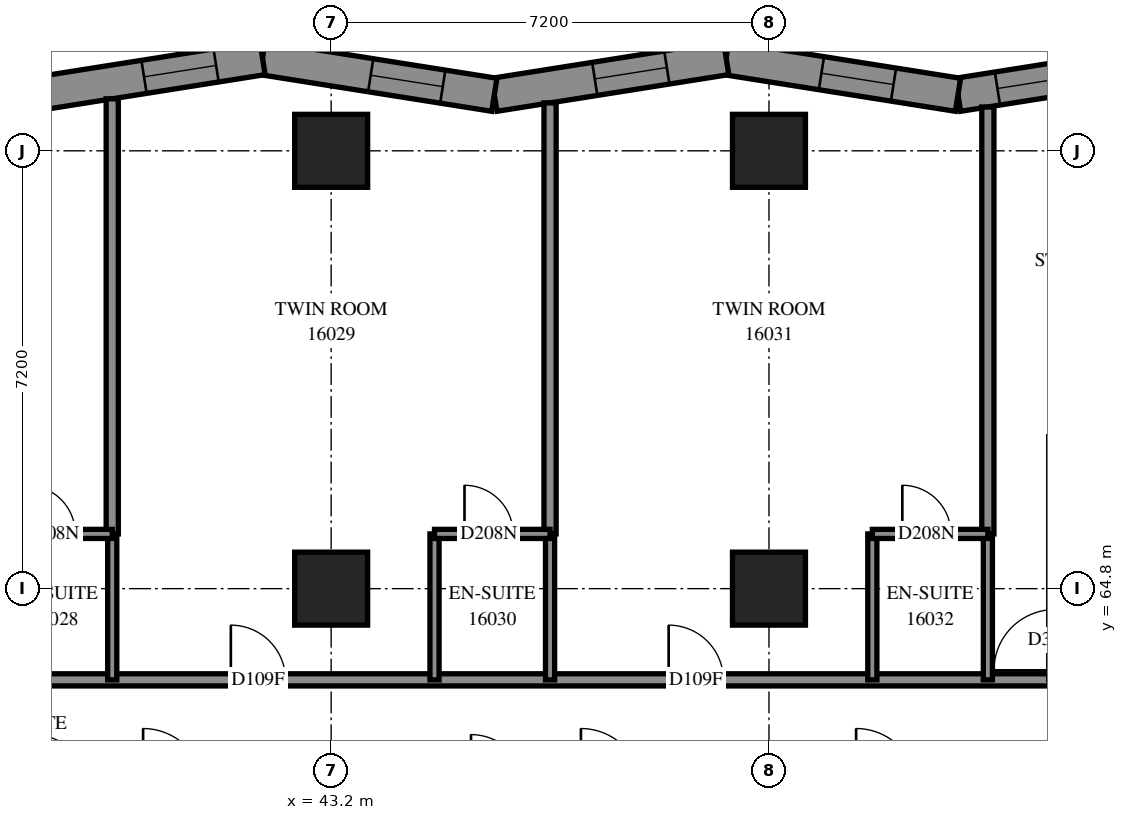
"""IFC4 building model, lengths in metres.
Left out: names, types, materials, properties, quantities, classifications, styles, units other than length and angle.
Written with IfcOpenShell. Run it as: python <this file> out.ifc"""

import sys

from ifc_helpers import new_model, si_unit, direction, frame, frame_2d, origin, origin_2d, place, context, subcontext, project, spatial, polyline, rectangle, outline, extrude, element, fill, save


model = new_model("IFC4")
c1 = context("Model", 3, precision=1e-05, world=origin(), true_north=direction((0.0, 1.0)))
c2 = subcontext(c1, "Body", "Model", "MODEL_VIEW")
j1 = project(units=[si_unit("LENGTHUNIT", "METRE"), si_unit("PLANEANGLEUNIT", "RADIAN")], contexts=[c1])
p1 = place(None, origin())
s1 = spatial("IfcSite", under=j1, at=p1, CompositionType="ELEMENT")
p2 = place(p1, origin())
s2 = spatial("IfcBuilding", under=s1, at=p2, CompositionType="ELEMENT")
p3 = place(p2, frame((0.0, 0.0, 61.0)))
s3 = spatial("IfcBuildingStorey", under=s2, at=p3, CompositionType="ELEMENT", Elevation=61.0)
for number, where, z_axis, x_axis in (
    (1, (43.2, 64.8, 0.0), (0.0, 0.0, 1.0), (1.0, 0.0, 0.0)),
    (2, (43.2, 72.0, 0.0), (0.0, 0.0, 1.0), (1.0, 0.0, 0.0)),
    (3, (50.4, 64.8, 0.0), (0.0, 0.0, 1.0), (1.0, 0.0, 0.0)),
    (4, (50.4, 72.0, 0.0), (0.0, 0.0, 1.0), (1.0, 0.0, 0.0)),
):
    element("IfcColumn", number, at=place(p3, frame(where, z_axis=z_axis, x_axis=x_axis)), inside=s3, PredefinedType="COLUMN", context=c2, shape_type="SweptSolid", body=[
        extrude(rectangle(XDim=1.2, YDim=1.2, at=origin_2d()), origin(), (0.0, 0.0, 1.0), 3.1),
    ])
p4 = place(p3, frame((57.321, 73.525, 0.0), z_axis=(0.0, 0.0, 1.0), x_axis=(-0.9877213372, -0.1562259905, 0.0)))
e5 = element("IfcWall", 5, at=p4, inside=s3, PredefinedType="SOLIDWALL", context=c2, shape_type="SweptSolid", body=[
    extrude(outline(polyline([(-0.043, -0.275), (3.816, -0.275), (3.903, 0.275), (0.043, 0.275), (-0.043, -0.275)])), origin(), (0.0, 0.0, 1.0), 3.1),
])
p5 = place(p4, frame((0.403, 0.0, 0.5)))
e6 = element("IfcOpeningElement", 6, at=p5, cuts=e5, PredefinedType="OPENING", context=c2, shape_type="SweptSolid", body=[
    extrude(rectangle(XDim=2.8, YDim=2.45, at=frame_2d((1.4, 1.225))), frame((0.0, 0.285, 0.0), z_axis=(0.0, -1.0, 0.0), x_axis=(1.0, 0.0, 0.0)), (0.0, 0.0, 1.0), 0.57),
])
p6 = place(p3, frame((53.509, 72.922, 0.0), z_axis=(0.0, 0.0, 1.0), x_axis=(-0.9877213372, 0.1562259905, 0.0)))
e7 = element("IfcWall", 7, at=p6, inside=s3, PredefinedType="SOLIDWALL", context=c2, shape_type="SweptSolid", body=[
    extrude(outline(polyline([(0.043, -0.275), (3.903, -0.275), (3.816, 0.275), (-0.043, 0.275), (0.043, -0.275)])), origin(), (0.0, 0.0, 1.0), 3.1),
])
p7 = place(p6, frame((1.074, 0.0, 0.5)))
e8 = element("IfcOpeningElement", 8, at=p7, cuts=e7, PredefinedType="OPENING", context=c2, shape_type="SweptSolid", body=[
    extrude(rectangle(XDim=1.2, YDim=2.45, at=frame_2d((0.6, 1.225))), frame((0.0, 0.285, 0.0), z_axis=(0.0, -1.0, 0.0), x_axis=(1.0, 0.0, 0.0)), (0.0, 0.0, 1.0), 0.57),
])
p8 = place(p3, frame((49.696, 73.525, 0.0), z_axis=(0.0, 0.0, 1.0), x_axis=(-0.9877213372, -0.1562259905, 0.0)))
e9 = element("IfcWall", 9, at=p8, inside=s3, PredefinedType="SOLIDWALL", context=c2, shape_type="SweptSolid", body=[
    extrude(outline(polyline([(-0.043, -0.275), (3.816, -0.275), (3.903, 0.275), (0.043, 0.275), (-0.043, -0.275)])), origin(), (0.0, 0.0, 1.0), 3.1),
])
p9 = place(p8, frame((0.988, 0.0, 0.5)))
e10 = element("IfcOpeningElement", 10, at=p9, cuts=e9, PredefinedType="OPENING", context=c2, shape_type="SweptSolid", body=[
    extrude(rectangle(XDim=1.2, YDim=2.45, at=frame_2d((0.6, 1.225))), frame((0.0, 0.285, 0.0), z_axis=(0.0, -1.0, 0.0), x_axis=(1.0, 0.0, 0.0)), (0.0, 0.0, 1.0), 0.57),
])
p10 = place(p3, frame((45.884, 72.922, 0.0), z_axis=(0.0, 0.0, 1.0), x_axis=(-0.9877213372, 0.1562259905, 0.0)))
e11 = element("IfcWall", 11, at=p10, inside=s3, PredefinedType="SOLIDWALL", context=c2, shape_type="SweptSolid", body=[
    extrude(outline(polyline([(0.043, -0.275), (3.903, -0.275), (3.816, 0.275), (-0.043, 0.275), (0.043, -0.275)])), origin(), (0.0, 0.0, 1.0), 3.1),
])
p11 = place(p10, frame((0.859, 0.0, 0.5)))
e12 = element("IfcOpeningElement", 12, at=p11, cuts=e11, PredefinedType="OPENING", context=c2, shape_type="SweptSolid", body=[
    extrude(rectangle(XDim=1.2, YDim=2.45, at=frame_2d((0.6, 1.225))), frame((0.0, 0.285, 0.0), z_axis=(0.0, -1.0, 0.0), x_axis=(1.0, 0.0, 0.0)), (0.0, 0.0, 1.0), 0.57),
])
p12 = place(p3, frame((42.071, 73.525, 0.0), z_axis=(0.0, 0.0, 1.0), x_axis=(-0.9877213372, -0.1562259905, 0.0)))
e13 = element("IfcWall", 13, at=p12, inside=s3, PredefinedType="SOLIDWALL", context=c2, shape_type="SweptSolid", body=[
    extrude(outline(polyline([(-0.043, -0.275), (3.816, -0.275), (3.903, 0.275), (0.043, 0.275), (-0.043, -0.275)])), origin(), (0.0, 0.0, 1.0), 3.1),
])
p13 = place(p12, frame((0.773, 0.0, 0.5)))
e14 = element("IfcOpeningElement", 14, at=p13, cuts=e13, PredefinedType="OPENING", context=c2, shape_type="SweptSolid", body=[
    extrude(rectangle(XDim=1.2, YDim=2.45, at=frame_2d((0.6, 1.225))), frame((0.0, 0.285, 0.0), z_axis=(0.0, -1.0, 0.0), x_axis=(1.0, 0.0, 0.0)), (0.0, 0.0, 1.0), 0.57),
])
p14 = place(p3, frame((33.302, 63.3, 0.0), z_axis=(0.0, 0.0, 1.0), x_axis=(1.0, 0.0, 0.0)))
e15 = element("IfcWall", 15, at=p14, inside=s3, PredefinedType="PARTITIONING", context=c2, shape_type="SweptSolid", body=[
    extrude(rectangle(XDim=21.798, YDim=0.2, at=frame_2d((10.899, 0.0))), origin(), (0.0, 0.0, 1.0), 3.1),
])
p15 = place(p14, frame((1.091, 0.0, 0.0)))
e16 = element("IfcOpeningElement", 16, at=p15, cuts=e15, PredefinedType="OPENING", context=c2, shape_type="SweptSolid", body=[
    extrude(rectangle(XDim=0.9, YDim=2.1, at=frame_2d((0.45, 1.05))), frame((0.0, 0.11, 0.0), z_axis=(0.0, -1.0, 0.0), x_axis=(1.0, 0.0, 0.0)), (0.0, 0.0, 1.0), 0.22),
])
p16 = place(p14, frame((8.248, 0.0, 0.0)))
e17 = element("IfcOpeningElement", 17, at=p16, cuts=e15, PredefinedType="OPENING", context=c2, shape_type="SweptSolid", body=[
    extrude(rectangle(XDim=0.9, YDim=2.1, at=frame_2d((0.45, 1.05))), frame((0.0, 0.11, 0.0), z_axis=(0.0, -1.0, 0.0), x_axis=(1.0, 0.0, 0.0)), (0.0, 0.0, 1.0), 0.22),
])
p17 = place(p14, frame((15.448, 0.0, 0.0)))
e18 = element("IfcOpeningElement", 18, at=p17, cuts=e15, PredefinedType="OPENING", context=c2, shape_type="SweptSolid", body=[
    extrude(rectangle(XDim=0.9, YDim=2.1, at=frame_2d((0.45, 1.05))), frame((0.0, 0.11, 0.0), z_axis=(0.0, -1.0, 0.0), x_axis=(1.0, 0.0, 0.0)), (0.0, 0.0, 1.0), 0.22),
])
p18 = place(p3, frame((39.6, 65.7, 0.0), z_axis=(0.0, 0.0, 1.0), x_axis=(0.0, 1.0, 0.0)))
e19 = element("IfcWall", 19, at=p18, inside=s3, PredefinedType="PARTITIONING", context=c2, shape_type="SweptSolid", body=[
    extrude(rectangle(XDim=7.155, YDim=0.2, at=frame_2d((3.578, 0.0))), origin(), (0.0, 0.0, 1.0), 3.1),
])
p19 = place(p3, frame((46.8, 65.7, 0.0), z_axis=(0.0, 0.0, 1.0), x_axis=(0.0, 1.0, 0.0)))
e20 = element("IfcWall", 20, at=p19, inside=s3, PredefinedType="PARTITIONING", context=c2, shape_type="SweptSolid", body=[
    extrude(rectangle(XDim=7.088, YDim=0.2, at=frame_2d((3.544, 0.0))), origin(), (0.0, 0.0, 1.0), 3.1),
])
p20 = place(p3, frame((54.0, 65.7, 0.0), z_axis=(0.0, 0.0, 1.0), x_axis=(0.0, 1.0, 0.0)))
e21 = element("IfcWall", 21, at=p20, inside=s3, PredefinedType="PARTITIONING", context=c2, shape_type="SweptSolid", body=[
    extrude(rectangle(XDim=7.021, YDim=0.2, at=frame_2d((3.51, 0.0))), origin(), (0.0, 0.0, 1.0), 3.1),
])
for number, where, z_axis, x_axis in (
    (22, (39.6, 63.3, 0.0), (0.0, 0.0, 1.0), (0.0, 1.0, 0.0)),
    (23, (44.9, 63.3, 0.0), (0.0, 0.0, 1.0), (0.0, 1.0, 0.0)),
    (24, (46.8, 63.3, 0.0), (0.0, 0.0, 1.0), (0.0, 1.0, 0.0)),
    (25, (52.1, 63.3, 0.0), (0.0, 0.0, 1.0), (0.0, 1.0, 0.0)),
    (26, (54.0, 63.3, 0.0), (0.0, 0.0, 1.0), (0.0, 1.0, 0.0)),
):
    element("IfcWall", number, at=place(p3, frame(where, z_axis=z_axis, x_axis=x_axis)), inside=s3, PredefinedType="PARTITIONING", context=c2, shape_type="SweptSolid", body=[
        extrude(rectangle(XDim=2.4, YDim=0.15, at=frame_2d((1.2, 0.0))), origin(), (0.0, 0.0, 1.0), 3.1),
    ])
p21 = place(p3, frame((37.7, 65.7, 0.0), z_axis=(0.0, 0.0, 1.0), x_axis=(1.0, 0.0, 0.0)))
e27 = element("IfcWall", 27, at=p21, inside=s3, PredefinedType="PARTITIONING", context=c2, shape_type="SweptSolid", body=[
    extrude(rectangle(XDim=1.9, YDim=0.15, at=frame_2d((0.95, 0.0))), origin(), (0.0, 0.0, 1.0), 3.1),
])
p22 = place(p21, frame((0.493, 0.0, 0.0)))
e28 = element("IfcOpeningElement", 28, at=p22, cuts=e27, PredefinedType="OPENING", context=c2, shape_type="SweptSolid", body=[
    extrude(rectangle(XDim=0.8, YDim=2.1, at=frame_2d((0.4, 1.05))), frame((0.0, 0.085, 0.0), z_axis=(0.0, -1.0, 0.0), x_axis=(1.0, 0.0, 0.0)), (0.0, 0.0, 1.0), 0.17),
])
p23 = place(p3, frame((44.9, 65.7, 0.0), z_axis=(0.0, 0.0, 1.0), x_axis=(1.0, 0.0, 0.0)))
e29 = element("IfcWall", 29, at=p23, inside=s3, PredefinedType="PARTITIONING", context=c2, shape_type="SweptSolid", body=[
    extrude(rectangle(XDim=1.9, YDim=0.15, at=frame_2d((0.95, 0.0))), origin(), (0.0, 0.0, 1.0), 3.1),
])
p24 = place(p23, frame((0.493, 0.0, 0.0)))
e30 = element("IfcOpeningElement", 30, at=p24, cuts=e29, PredefinedType="OPENING", context=c2, shape_type="SweptSolid", body=[
    extrude(rectangle(XDim=0.8, YDim=2.1, at=frame_2d((0.4, 1.05))), frame((0.0, 0.085, 0.0), z_axis=(0.0, -1.0, 0.0), x_axis=(1.0, 0.0, 0.0)), (0.0, 0.0, 1.0), 0.17),
])
p25 = place(p3, frame((52.1, 65.7, 0.0), z_axis=(0.0, 0.0, 1.0), x_axis=(1.0, 0.0, 0.0)))
e31 = element("IfcWall", 31, at=p25, inside=s3, PredefinedType="PARTITIONING", context=c2, shape_type="SweptSolid", body=[
    extrude(rectangle(XDim=1.9, YDim=0.15, at=frame_2d((0.95, 0.0))), origin(), (0.0, 0.0, 1.0), 3.1),
])
p26 = place(p25, frame((0.493, 0.0, 0.0)))
e32 = element("IfcOpeningElement", 32, at=p26, cuts=e31, PredefinedType="OPENING", context=c2, shape_type="SweptSolid", body=[
    extrude(rectangle(XDim=0.8, YDim=2.1, at=frame_2d((0.4, 1.05))), frame((0.0, 0.085, 0.0), z_axis=(0.0, -1.0, 0.0), x_axis=(1.0, 0.0, 0.0)), (0.0, 0.0, 1.0), 0.17),
])
p27 = place(p5, origin())
e33 = element("IfcWindow", 33, at=p27, inside=s3, PartitioningType="SINGLE_PANEL", PredefinedType="WINDOW", context=c2, shape_type="SweptSolid", body=[
    extrude(rectangle(XDim=2.8, YDim=2.45, at=frame_2d((1.4, 1.225))), frame((0.0, 0.155, 0.0), z_axis=(0.0, -1.0, 0.0), x_axis=(1.0, 0.0, 0.0)), (0.0, 0.0, 1.0), 0.06),
])
fill(e6, e33)
p28 = place(p7, origin())
e34 = element("IfcWindow", 34, at=p28, inside=s3, PartitioningType="SINGLE_PANEL", PredefinedType="WINDOW", context=c2, shape_type="SweptSolid", body=[
    extrude(rectangle(XDim=1.2, YDim=2.45, at=frame_2d((0.6, 1.225))), frame((0.0, 0.155, 0.0), z_axis=(0.0, -1.0, 0.0), x_axis=(1.0, 0.0, 0.0)), (0.0, 0.0, 1.0), 0.06),
])
fill(e8, e34)
p29 = place(p9, origin())
e35 = element("IfcWindow", 35, at=p29, inside=s3, PartitioningType="SINGLE_PANEL", PredefinedType="WINDOW", context=c2, shape_type="SweptSolid", body=[
    extrude(rectangle(XDim=1.2, YDim=2.45, at=frame_2d((0.6, 1.225))), frame((0.0, 0.155, 0.0), z_axis=(0.0, -1.0, 0.0), x_axis=(1.0, 0.0, 0.0)), (0.0, 0.0, 1.0), 0.06),
])
fill(e10, e35)
p30 = place(p11, origin())
e36 = element("IfcWindow", 36, at=p30, inside=s3, PartitioningType="SINGLE_PANEL", PredefinedType="WINDOW", context=c2, shape_type="SweptSolid", body=[
    extrude(rectangle(XDim=1.2, YDim=2.45, at=frame_2d((0.6, 1.225))), frame((0.0, 0.155, 0.0), z_axis=(0.0, -1.0, 0.0), x_axis=(1.0, 0.0, 0.0)), (0.0, 0.0, 1.0), 0.06),
])
fill(e12, e36)
p31 = place(p13, origin())
e37 = element("IfcWindow", 37, at=p31, inside=s3, PartitioningType="SINGLE_PANEL", PredefinedType="WINDOW", context=c2, shape_type="SweptSolid", body=[
    extrude(rectangle(XDim=1.2, YDim=2.45, at=frame_2d((0.6, 1.225))), frame((0.0, 0.155, 0.0), z_axis=(0.0, -1.0, 0.0), x_axis=(1.0, 0.0, 0.0)), (0.0, 0.0, 1.0), 0.06),
])
fill(e14, e37)
p32 = place(p22, origin())
e38 = element("IfcDoor", 38, at=p32, inside=s3, OperationType="SINGLE_SWING_RIGHT", PredefinedType="DOOR", context=c2, shape_type="SweptSolid", body=[
    extrude(rectangle(XDim=0.8, YDim=2.1, at=frame_2d((0.4, 1.05))), frame((0.0, 0.025, 0.0), z_axis=(0.0, -1.0, 0.0), x_axis=(1.0, 0.0, 0.0)), (0.0, 0.0, 1.0), 0.05),
])
fill(e28, e38)
p33 = place(p16, origin())
e39 = element("IfcDoor", 39, at=p33, inside=s3, OperationType="SINGLE_SWING_LEFT", PredefinedType="DOOR", context=c2, shape_type="SweptSolid", body=[
    extrude(rectangle(XDim=0.9, YDim=2.1, at=frame_2d((0.45, 1.05))), frame((0.0, 0.025, 0.0), z_axis=(0.0, -1.0, 0.0), x_axis=(1.0, 0.0, 0.0)), (0.0, 0.0, 1.0), 0.05),
])
fill(e17, e39)
p34 = place(p24, origin())
e40 = element("IfcDoor", 40, at=p34, inside=s3, OperationType="SINGLE_SWING_RIGHT", PredefinedType="DOOR", context=c2, shape_type="SweptSolid", body=[
    extrude(rectangle(XDim=0.8, YDim=2.1, at=frame_2d((0.4, 1.05))), frame((0.0, 0.025, 0.0), z_axis=(0.0, -1.0, 0.0), x_axis=(1.0, 0.0, 0.0)), (0.0, 0.0, 1.0), 0.05),
])
fill(e30, e40)
p35 = place(p17, origin())
e41 = element("IfcDoor", 41, at=p35, inside=s3, OperationType="SINGLE_SWING_LEFT", PredefinedType="DOOR", context=c2, shape_type="SweptSolid", body=[
    extrude(rectangle(XDim=0.9, YDim=2.1, at=frame_2d((0.45, 1.05))), frame((0.0, 0.025, 0.0), z_axis=(0.0, -1.0, 0.0), x_axis=(1.0, 0.0, 0.0)), (0.0, 0.0, 1.0), 0.05),
])
fill(e18, e41)
p36 = place(p26, origin())
e42 = element("IfcDoor", 42, at=p36, inside=s3, OperationType="SINGLE_SWING_RIGHT", PredefinedType="DOOR", context=c2, shape_type="SweptSolid", body=[
    extrude(rectangle(XDim=0.8, YDim=2.1, at=frame_2d((0.4, 1.05))), frame((0.0, 0.025, 0.0), z_axis=(0.0, -1.0, 0.0), x_axis=(1.0, 0.0, 0.0)), (0.0, 0.0, 1.0), 0.05),
])
fill(e32, e42)
save(model, sys.argv[1])
